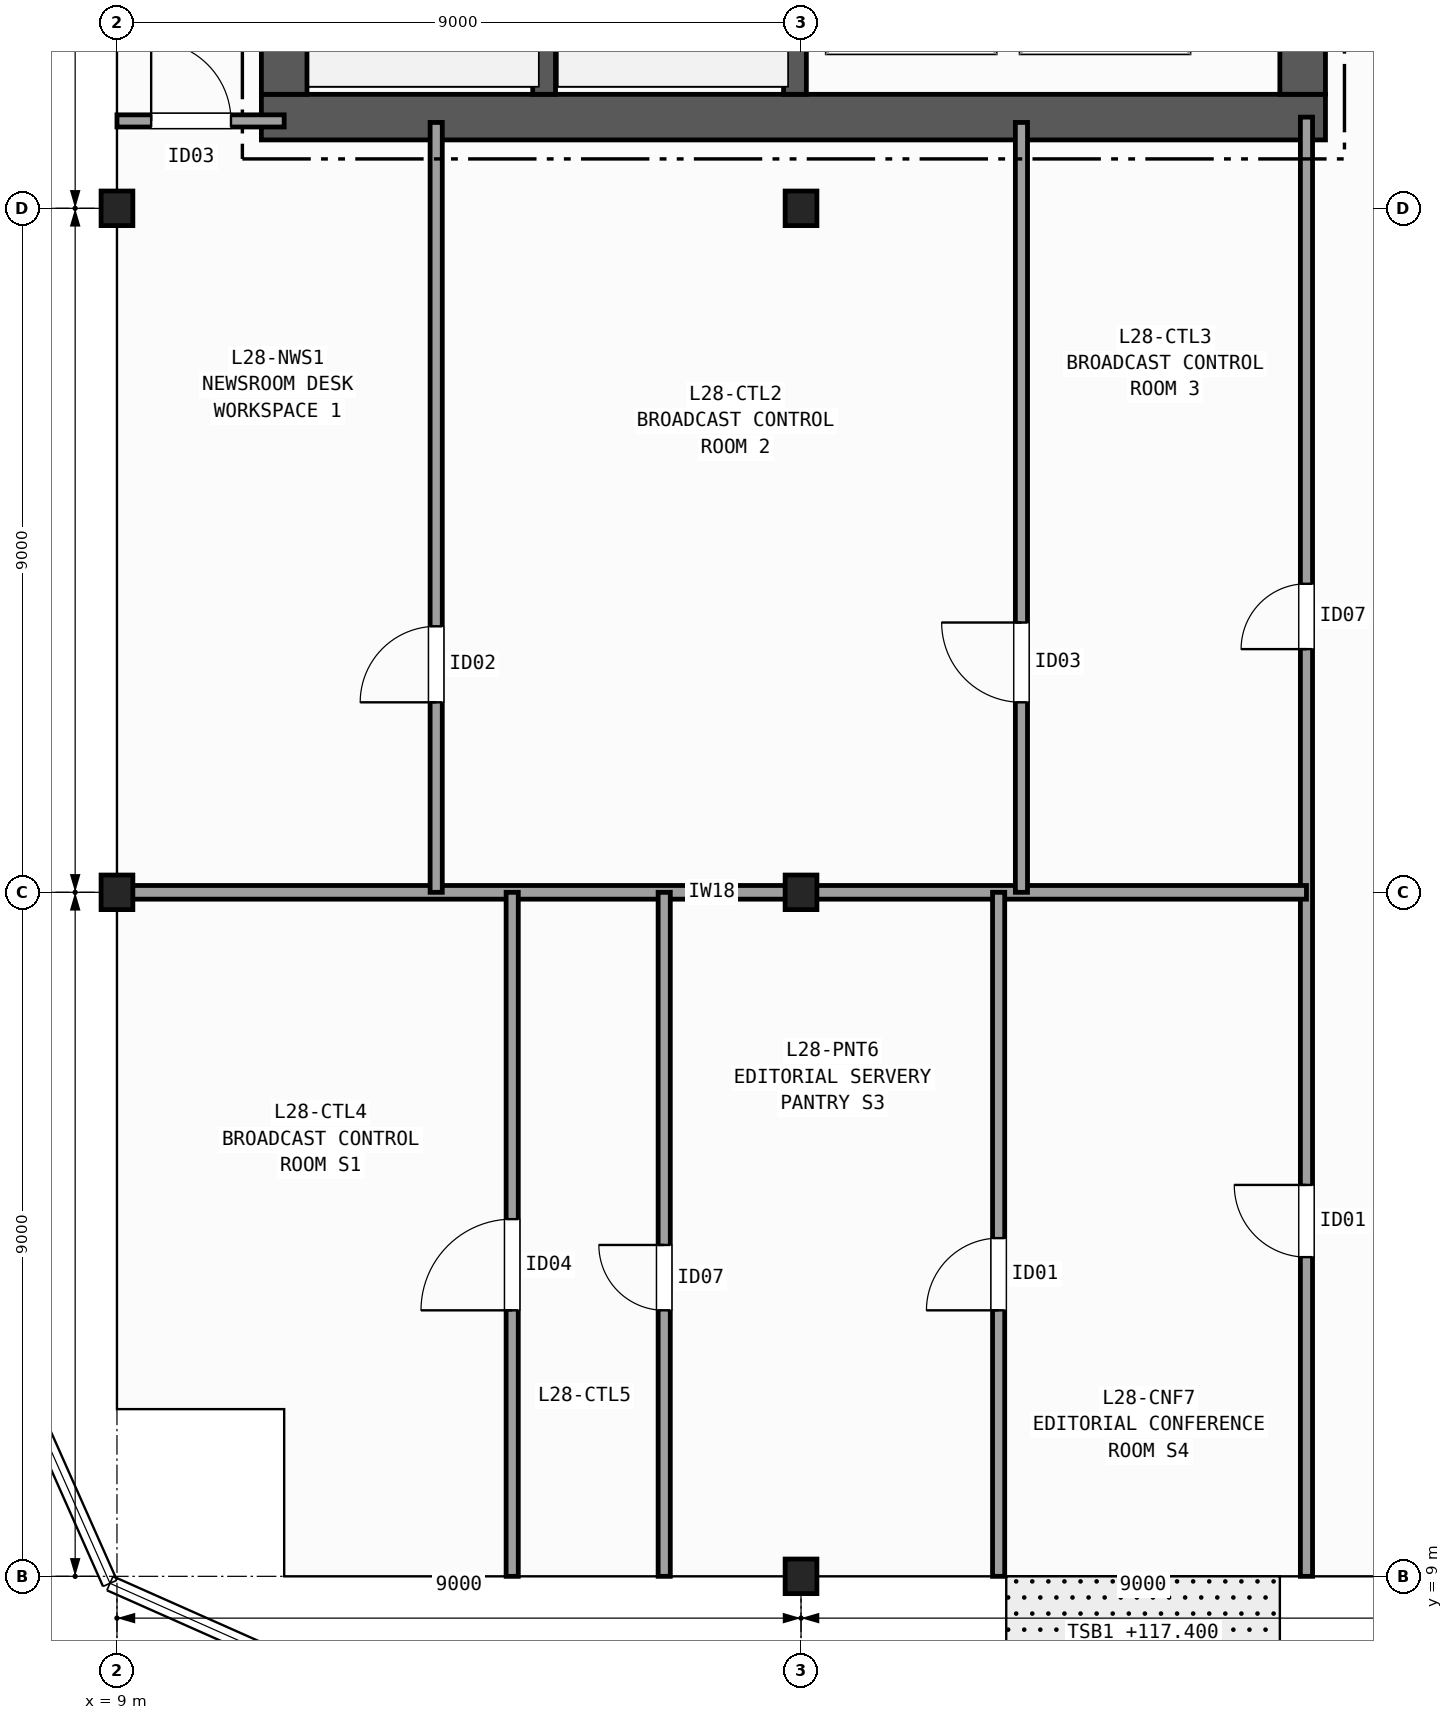
"""IFC4 building model, lengths in metres.
Left out: names, types, materials, properties, quantities, classifications, styles, units other than length and angle.
Written with IfcOpenShell. Run it as: python <this file> out.ifc"""

import sys

from ifc_helpers import new_model, si_unit, direction, frame, frame_2d, origin, origin_2d, place, context, subcontext, project, spatial, rectangle, i_section, extrude, element, fill, save


model = new_model("IFC4")
c1 = context("Model", 3, precision=1e-05, world=origin(), true_north=direction((0.0, 1.0)))
c2 = subcontext(c1, "Body", "Model", "MODEL_VIEW")
j1 = project(units=[si_unit("LENGTHUNIT", "METRE"), si_unit("PLANEANGLEUNIT", "RADIAN")], contexts=[c1])
p1 = place(None, origin())
s1 = spatial("IfcSite", under=j1, at=p1, CompositionType="ELEMENT")
p2 = place(p1, origin())
s2 = spatial("IfcBuilding", under=s1, at=p2, CompositionType="ELEMENT")
p3 = place(p2, frame((0.0, 0.0, 117.4)))
s3 = spatial("IfcBuildingStorey", under=s2, at=p3, CompositionType="ELEMENT", Elevation=117.4)
for number, where, z_axis, x_axis in (
    (1, (9.0, 18.0, 0.0), (0.0, 0.0, 1.0), (1.0, 0.0, 0.0)),
    (2, (9.0, 27.0, 0.0), (0.0, 0.0, 1.0), (1.0, 0.0, 0.0)),
    (3, (18.0, 9.0, 0.0), (0.0, 0.0, 1.0), (1.0, 0.0, 0.0)),
    (4, (18.0, 18.0, 0.0), (0.0, 0.0, 1.0), (1.0, 0.0, 0.0)),
    (5, (18.0, 27.0, 0.0), (0.0, 0.0, 1.0), (1.0, 0.0, 0.0)),
):
    element("IfcColumn", number, at=place(p3, frame(where, z_axis=z_axis, x_axis=x_axis)), inside=s3, PredefinedType="COLUMN", context=c2, shape_type="SweptSolid", body=[
        extrude(i_section(OverallWidth=0.418, OverallDepth=0.455, WebThickness=0.042, FlangeThickness=0.068, FilletRadius=0.015, at=origin_2d()), origin(), (0.0, 0.0, 1.0), 3.7),
    ])
p4 = place(p3, frame((10.9, 28.2, 0.0), z_axis=(0.0, 0.0, 1.0), x_axis=(1.0, 0.0, 0.0)))
e6 = element("IfcWall", 6, at=p4, inside=s3, PredefinedType="SHEAR", context=c2, shape_type="SweptSolid", body=[
    extrude(rectangle(XDim=14.0, YDim=0.6, at=frame_2d((7.0, 0.0))), origin(), (0.0, 0.0, 1.0), 3.42),
])
p5 = place(p3, frame((11.2, 42.1, 0.0), z_axis=(0.0, 0.0, 1.0), x_axis=(0.0, -1.0, 0.0)))
e7 = element("IfcWall", 7, at=p5, inside=s3, PredefinedType="SHEAR", context=c2, shape_type="SweptSolid", body=[
    extrude(rectangle(XDim=13.6, YDim=0.6, at=frame_2d((6.8, 0.0))), origin(), (0.0, 0.0, 1.0), 3.42),
])
p6 = place(p3, frame((24.6, 28.5, 0.0), z_axis=(0.0, 0.0, 1.0), x_axis=(0.0, 1.0, 0.0)))
e8 = element("IfcWall", 8, at=p6, inside=s3, PredefinedType="SHEAR", context=c2, shape_type="SweptSolid", body=[
    extrude(rectangle(XDim=13.6, YDim=0.6, at=frame_2d((6.8, 0.0))), origin(), (0.0, 0.0, 1.0), 3.42),
])
p7 = place(p6, frame((3.3, 0.0, 0.0)))
e9 = element("IfcOpeningElement", 9, at=p7, cuts=e8, PredefinedType="OPENING", context=c2, shape_type="SweptSolid", body=[
    extrude(rectangle(XDim=1.5, YDim=2.2, at=frame_2d((0.75, 1.1))), frame((0.0, 0.31, 0.0), z_axis=(0.0, -1.0, 0.0), x_axis=(1.0, 0.0, 0.0)), (0.0, 0.0, 1.0), 0.62),
])
p8 = place(p6, frame((9.9, 0.0, 0.0)))
e10 = element("IfcOpeningElement", 10, at=p8, cuts=e8, PredefinedType="OPENING", context=c2, shape_type="SweptSolid", body=[
    extrude(rectangle(XDim=0.9, YDim=2.1, at=frame_2d((0.45, 1.05))), frame((0.0, 0.31, 0.0), z_axis=(0.0, -1.0, 0.0), x_axis=(1.0, 0.0, 0.0)), (0.0, 0.0, 1.0), 0.62),
])
p9 = place(p3, frame((14.62, 28.5, 0.0), z_axis=(0.0, 0.0, 1.0), x_axis=(0.0, 1.0, 0.0)))
e11 = element("IfcWall", 11, at=p9, inside=s3, PredefinedType="SHEAR", context=c2, shape_type="SweptSolid", body=[
    extrude(rectangle(XDim=8.95, YDim=0.3, at=frame_2d((4.475, 0.0))), origin(), (0.0, 0.0, 1.0), 3.42),
])
p10 = place(p3, frame((17.92, 42.1, 0.0), z_axis=(0.0, 0.0, 1.0), x_axis=(0.0, -1.0, 0.0)))
e12 = element("IfcWall", 12, at=p10, inside=s3, PredefinedType="SHEAR", context=c2, shape_type="SweptSolid", body=[
    extrude(rectangle(XDim=13.6, YDim=0.3, at=frame_2d((6.8, 0.0))), origin(), (0.0, 0.0, 1.0), 3.42),
])
p11 = place(p10, frame((1.925, 0.0, 0.0)))
e13 = element("IfcOpeningElement", 13, at=p11, cuts=e12, PredefinedType="OPENING", context=c2, shape_type="SweptSolid", body=[
    extrude(rectangle(XDim=1.15, YDim=2.15, at=frame_2d((0.575, 1.075))), frame((0.0, 0.16, 0.0), z_axis=(0.0, -1.0, 0.0), x_axis=(1.0, 0.0, 0.0)), (0.0, 0.0, 1.0), 0.32),
])
p12 = place(p3, frame((9.0, 28.15, 0.0), z_axis=(0.0, 0.0, 1.0), x_axis=(1.0, 0.0, 0.0)))
e14 = element("IfcWall", 14, at=p12, inside=s3, PredefinedType="PARTITIONING", context=c2, shape_type="SweptSolid", body=[
    extrude(rectangle(XDim=2.2, YDim=0.16, at=frame_2d((1.1, 0.0))), origin(), (0.0, 0.0, 1.0), 2.634),
])
p13 = place(p12, frame((0.45, 0.0, 0.0)))
e15 = element("IfcOpeningElement", 15, at=p13, cuts=e14, PredefinedType="OPENING", context=c2, shape_type="SweptSolid", body=[
    extrude(rectangle(XDim=1.05, YDim=2.15, at=frame_2d((0.525, 1.075))), frame((0.0, 0.09, 0.0), z_axis=(0.0, -1.0, 0.0), x_axis=(1.0, 0.0, 0.0)), (0.0, 0.0, 1.0), 0.18),
])
p14 = place(p3, frame((24.65, 9.0, 0.0), z_axis=(0.0, 0.0, 1.0), x_axis=(0.0, 1.0, 0.0)))
e16 = element("IfcWall", 16, at=p14, inside=s3, PredefinedType="PARTITIONING", context=c2, shape_type="SweptSolid", body=[
    extrude(rectangle(XDim=19.2, YDim=0.16, at=frame_2d((9.6, 0.0))), origin(), (0.0, 0.0, 1.0), 2.634),
])
p15 = place(p14, frame((12.2, 0.0, 0.0)))
e17 = element("IfcOpeningElement", 17, at=p15, cuts=e16, PredefinedType="OPENING", context=c2, shape_type="SweptSolid", body=[
    extrude(rectangle(XDim=0.86, YDim=2.05, at=frame_2d((0.43, 1.025))), frame((0.0, 0.09, 0.0), z_axis=(0.0, -1.0, 0.0), x_axis=(1.0, 0.0, 0.0)), (0.0, 0.0, 1.0), 0.18),
])
p16 = place(p14, frame((4.2, 0.0, 0.0)))
e18 = element("IfcOpeningElement", 18, at=p16, cuts=e16, PredefinedType="OPENING", context=c2, shape_type="SweptSolid", body=[
    extrude(rectangle(XDim=0.95, YDim=2.1, at=frame_2d((0.475, 1.05))), frame((0.0, 0.09, 0.0), z_axis=(0.0, -1.0, 0.0), x_axis=(1.0, 0.0, 0.0)), (0.0, 0.0, 1.0), 0.18),
])
p17 = place(p3, frame((9.0, 18.0, 0.0), z_axis=(0.0, 0.0, 1.0), x_axis=(1.0, 0.0, 0.0)))
e19 = element("IfcWall", 19, at=p17, inside=s3, PredefinedType="PARTITIONING", context=c2, shape_type="SweptSolid", body=[
    extrude(rectangle(XDim=15.65, YDim=0.18, at=frame_2d((7.825, 0.0))), origin(), (0.0, 0.0, 1.0), 2.634),
])
p18 = place(p3, frame((13.2, 18.0, 0.0), z_axis=(0.0, 0.0, 1.0), x_axis=(0.0, 1.0, 0.0)))
e20 = element("IfcWall", 20, at=p18, inside=s3, PredefinedType="PARTITIONING", context=c2, shape_type="SweptSolid", body=[
    extrude(rectangle(XDim=10.13, YDim=0.16, at=frame_2d((5.065, 0.0))), origin(), (0.0, 0.0, 1.0), 2.789),
])
p19 = place(p18, frame((2.5, 0.0, 0.0)))
e21 = element("IfcOpeningElement", 21, at=p19, cuts=e20, PredefinedType="OPENING", context=c2, shape_type="SweptSolid", body=[
    extrude(rectangle(XDim=1.0, YDim=2.1, at=frame_2d((0.5, 1.05))), frame((0.0, 0.09, 0.0), z_axis=(0.0, -1.0, 0.0), x_axis=(1.0, 0.0, 0.0)), (0.0, 0.0, 1.0), 0.18),
])
p20 = place(p3, frame((20.9, 18.0, 0.0), z_axis=(0.0, 0.0, 1.0), x_axis=(0.0, 1.0, 0.0)))
e22 = element("IfcWall", 22, at=p20, inside=s3, PredefinedType="PARTITIONING", context=c2, shape_type="SweptSolid", body=[
    extrude(rectangle(XDim=10.13, YDim=0.16, at=frame_2d((5.065, 0.0))), origin(), (0.0, 0.0, 1.0), 2.789),
])
p21 = place(p20, frame((2.5, 0.0, 0.0)))
e23 = element("IfcOpeningElement", 23, at=p21, cuts=e22, PredefinedType="OPENING", context=c2, shape_type="SweptSolid", body=[
    extrude(rectangle(XDim=1.05, YDim=2.15, at=frame_2d((0.525, 1.075))), frame((0.0, 0.09, 0.0), z_axis=(0.0, -1.0, 0.0), x_axis=(1.0, 0.0, 0.0)), (0.0, 0.0, 1.0), 0.18),
])
p22 = place(p3, frame((14.2, 9.0, 0.0), z_axis=(0.0, 0.0, 1.0), x_axis=(0.0, 1.0, 0.0)))
e24 = element("IfcWall", 24, at=p22, inside=s3, PredefinedType="PARTITIONING", context=c2, shape_type="SweptSolid", body=[
    extrude(rectangle(XDim=9.0, YDim=0.16, at=frame_2d((4.5, 0.0))), origin(), (0.0, 0.0, 1.0), 2.789),
])
p23 = place(p22, frame((3.5, 0.0, 0.0)))
e25 = element("IfcOpeningElement", 25, at=p23, cuts=e24, PredefinedType="OPENING", context=c2, shape_type="SweptSolid", body=[
    extrude(rectangle(XDim=1.2, YDim=2.15, at=frame_2d((0.6, 1.075))), frame((0.0, 0.09, 0.0), z_axis=(0.0, -1.0, 0.0), x_axis=(1.0, 0.0, 0.0)), (0.0, 0.0, 1.0), 0.18),
])
p24 = place(p3, frame((16.2, 9.0, 0.0), z_axis=(0.0, 0.0, 1.0), x_axis=(0.0, 1.0, 0.0)))
e26 = element("IfcWall", 26, at=p24, inside=s3, PredefinedType="PARTITIONING", context=c2, shape_type="SweptSolid", body=[
    extrude(rectangle(XDim=9.0, YDim=0.16, at=frame_2d((4.5, 0.0))), origin(), (0.0, 0.0, 1.0), 2.789),
])
p25 = place(p24, frame((3.5, 0.0, 0.0)))
e27 = element("IfcOpeningElement", 27, at=p25, cuts=e26, PredefinedType="OPENING", context=c2, shape_type="SweptSolid", body=[
    extrude(rectangle(XDim=0.86, YDim=2.05, at=frame_2d((0.43, 1.025))), frame((0.0, 0.09, 0.0), z_axis=(0.0, -1.0, 0.0), x_axis=(1.0, 0.0, 0.0)), (0.0, 0.0, 1.0), 0.18),
])
p26 = place(p3, frame((20.6, 9.0, 0.0), z_axis=(0.0, 0.0, 1.0), x_axis=(0.0, 1.0, 0.0)))
e28 = element("IfcWall", 28, at=p26, inside=s3, PredefinedType="PARTITIONING", context=c2, shape_type="SweptSolid", body=[
    extrude(rectangle(XDim=9.0, YDim=0.16, at=frame_2d((4.5, 0.0))), origin(), (0.0, 0.0, 1.0), 2.634),
])
p27 = place(p26, frame((3.5, 0.0, 0.0)))
e29 = element("IfcOpeningElement", 29, at=p27, cuts=e28, PredefinedType="OPENING", context=c2, shape_type="SweptSolid", body=[
    extrude(rectangle(XDim=0.95, YDim=2.1, at=frame_2d((0.475, 1.05))), frame((0.0, 0.09, 0.0), z_axis=(0.0, -1.0, 0.0), x_axis=(1.0, 0.0, 0.0)), (0.0, 0.0, 1.0), 0.18),
])
p28 = place(p13, origin())
e30 = element("IfcDoor", 30, at=p28, inside=s3, OperationType="SINGLE_SWING_LEFT", PredefinedType="DOOR", context=c2, shape_type="SweptSolid", body=[
    extrude(rectangle(XDim=1.05, YDim=2.15, at=frame_2d((0.525, 1.075))), frame((0.0, 0.025, 0.0), z_axis=(0.0, -1.0, 0.0), x_axis=(1.0, 0.0, 0.0)), (0.0, 0.0, 1.0), 0.05),
])
fill(e15, e30)
p29 = place(p15, origin())
e31 = element("IfcDoor", 31, at=p29, inside=s3, OperationType="SINGLE_SWING_LEFT", PredefinedType="DOOR", context=c2, shape_type="SweptSolid", body=[
    extrude(rectangle(XDim=0.86, YDim=2.05, at=frame_2d((0.43, 1.025))), frame((0.0, 0.025, 0.0), z_axis=(0.0, -1.0, 0.0), x_axis=(1.0, 0.0, 0.0)), (0.0, 0.0, 1.0), 0.05),
])
fill(e17, e31)
p30 = place(p16, origin())
e32 = element("IfcDoor", 32, at=p30, inside=s3, OperationType="SINGLE_SWING_RIGHT", PredefinedType="DOOR", context=c2, shape_type="SweptSolid", body=[
    extrude(rectangle(XDim=0.95, YDim=2.1, at=frame_2d((0.475, 1.05))), frame((0.0, 0.025, 0.0), z_axis=(0.0, -1.0, 0.0), x_axis=(1.0, 0.0, 0.0)), (0.0, 0.0, 1.0), 0.05),
])
fill(e18, e32)
p31 = place(p19, origin())
e33 = element("IfcDoor", 33, at=p31, inside=s3, OperationType="SINGLE_SWING_LEFT", PredefinedType="DOOR", context=c2, shape_type="SweptSolid", body=[
    extrude(rectangle(XDim=1.0, YDim=2.1, at=frame_2d((0.5, 1.05))), frame((0.0, 0.025, 0.0), z_axis=(0.0, -1.0, 0.0), x_axis=(1.0, 0.0, 0.0)), (0.0, 0.0, 1.0), 0.05),
])
fill(e21, e33)
p32 = place(p21, origin())
e34 = element("IfcDoor", 34, at=p32, inside=s3, OperationType="SINGLE_SWING_RIGHT", PredefinedType="DOOR", context=c2, shape_type="SweptSolid", body=[
    extrude(rectangle(XDim=1.05, YDim=2.15, at=frame_2d((0.525, 1.075))), frame((0.0, 0.025, 0.0), z_axis=(0.0, -1.0, 0.0), x_axis=(1.0, 0.0, 0.0)), (0.0, 0.0, 1.0), 0.05),
])
fill(e23, e34)
p33 = place(p23, origin())
e35 = element("IfcDoor", 35, at=p33, inside=s3, OperationType="SINGLE_SWING_LEFT", PredefinedType="DOOR", context=c2, shape_type="SweptSolid", body=[
    extrude(rectangle(XDim=1.2, YDim=2.15, at=frame_2d((0.6, 1.075))), frame((0.0, 0.025, 0.0), z_axis=(0.0, -1.0, 0.0), x_axis=(1.0, 0.0, 0.0)), (0.0, 0.0, 1.0), 0.05),
])
fill(e25, e35)
p34 = place(p25, origin())
e36 = element("IfcDoor", 36, at=p34, inside=s3, OperationType="SINGLE_SWING_RIGHT", PredefinedType="DOOR", context=c2, shape_type="SweptSolid", body=[
    extrude(rectangle(XDim=0.86, YDim=2.05, at=frame_2d((0.43, 1.025))), frame((0.0, 0.025, 0.0), z_axis=(0.0, -1.0, 0.0), x_axis=(1.0, 0.0, 0.0)), (0.0, 0.0, 1.0), 0.05),
])
fill(e27, e36)
p35 = place(p27, origin())
e37 = element("IfcDoor", 37, at=p35, inside=s3, OperationType="SINGLE_SWING_LEFT", PredefinedType="DOOR", context=c2, shape_type="SweptSolid", body=[
    extrude(rectangle(XDim=0.95, YDim=2.1, at=frame_2d((0.475, 1.05))), frame((0.0, 0.025, 0.0), z_axis=(0.0, -1.0, 0.0), x_axis=(1.0, 0.0, 0.0)), (0.0, 0.0, 1.0), 0.05),
])
fill(e29, e37)
save(model, sys.argv[1])
